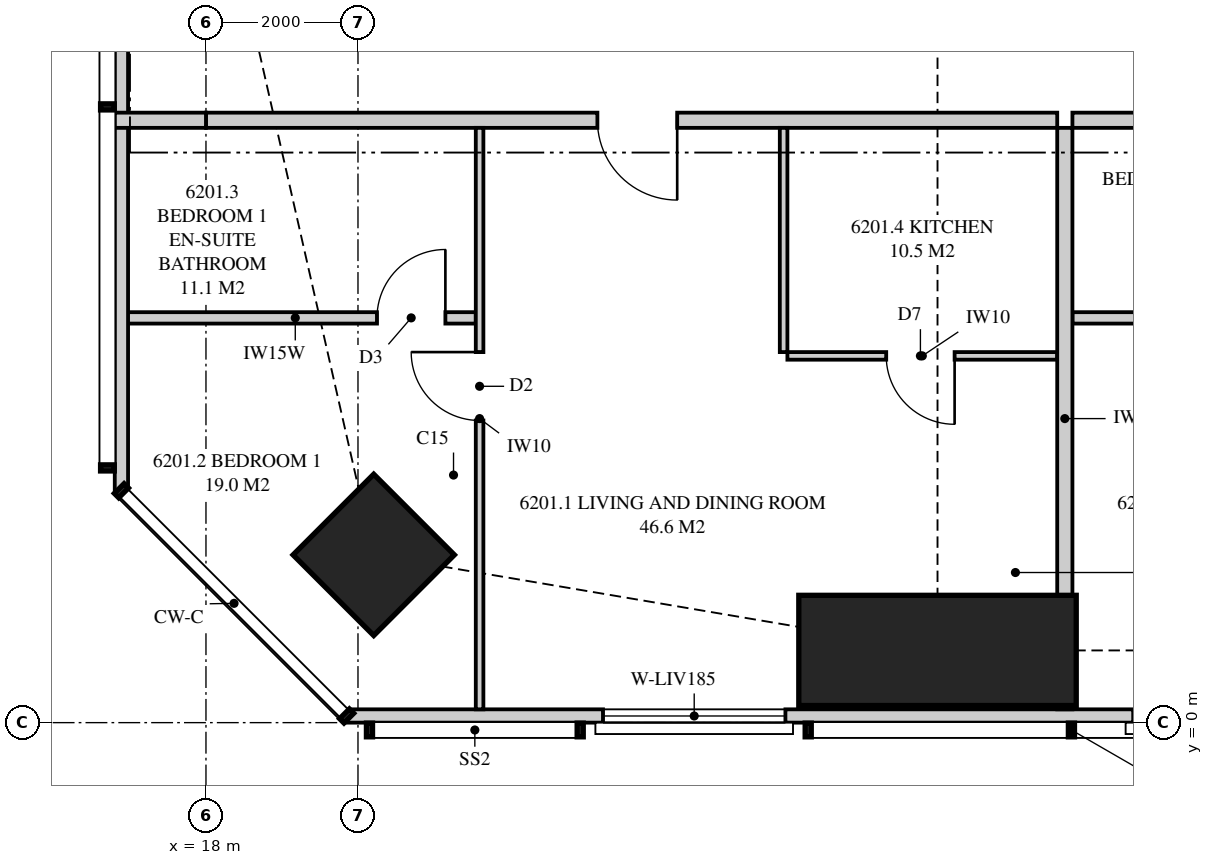
"""IFC4 building model, lengths in metres.
Left out: names, types, materials, properties, quantities, classifications, styles, units other than length and angle.
Written with IfcOpenShell. Run it as: python <this file> out.ifc"""

import sys

from ifc_helpers import new_model, si_unit, direction, frame, frame_2d, origin, origin_2d, place, context, subcontext, project, spatial, polyline, rectangle, outline, extrude, element, fill, save


model = new_model("IFC4")
c1 = context("Model", 3, precision=1e-05, world=origin(), true_north=direction((0.0, 1.0)))
c2 = subcontext(c1, "Body", "Model", "MODEL_VIEW")
j1 = project(units=[si_unit("LENGTHUNIT", "METRE"), si_unit("PLANEANGLEUNIT", "RADIAN")], contexts=[c1])
p1 = place(None, origin())
s1 = spatial("IfcSite", under=j1, at=p1, CompositionType="ELEMENT")
p2 = place(p1, origin())
s2 = spatial("IfcBuilding", under=s1, at=p2, CompositionType="ELEMENT")
p3 = place(p2, frame((0.0, 0.0, 228.45)))
s3 = spatial("IfcBuildingStorey", under=s2, at=p3, CompositionType="ELEMENT", Elevation=228.45)
p4 = place(p3, frame((20.207, 2.207, 0.0), z_axis=(0.0, 0.0, 1.0), x_axis=(0.707106781187, 0.707106781187, 0.0)))
e1 = element("IfcColumn", 1, at=p4, inside=s3, PredefinedType="COLUMN", context=c2, shape_type="SweptSolid", body=[
    extrude(rectangle(XDim=1.5, YDim=1.5, at=origin_2d()), origin(), (0.0, 0.0, 1.0), 3.5),
])
p5 = place(p3, frame((27.625, 0.95, 0.0), z_axis=(0.0, 0.0, 1.0), x_axis=(0.0, 1.0, 0.0)))
e2 = element("IfcColumn", 2, at=p5, inside=s3, PredefinedType="COLUMN", context=c2, shape_type="SweptSolid", body=[
    extrude(rectangle(XDim=1.45, YDim=3.65, at=origin_2d()), origin(), (0.0, 0.0, 1.0), 3.5),
])
p6 = place(p3, frame((19.851, 0.087, 0.0), z_axis=(0.0, 0.0, 1.0), x_axis=(1.0, 0.0, 0.0)))
e3 = element("IfcWall", 3, at=p6, inside=s3, PredefinedType="SOLIDWALL", context=c2, shape_type="SweptSolid", body=[
    extrude(outline(polyline([(0.0, 0.0), (33.597, 0.0), (33.597, 3.26), (27.239, 3.26), (27.239, 2.3), (27.155, 2.3), (27.155, 3.26), (27.024, 3.26), (27.024, 2.3), (7.774, 2.3), (7.774, 3.26), (7.642, 3.26), (7.642, 2.3), (7.559, 2.3), (7.559, 3.26), (0.0, 3.26), (0.0, 0.0)])), frame((0.0, 0.087, 0.0), z_axis=(0.0, -1.0, 0.0), x_axis=(1.0, 0.0, 0.0)), (0.0, 0.0, 1.0), 0.175),
])
p7 = place(p6, frame((3.373, 0.0, 0.4)))
e4 = element("IfcOpeningElement", 4, at=p7, cuts=e3, PredefinedType="OPENING", context=c2, shape_type="SweptSolid", body=[
    extrude(rectangle(XDim=2.4, YDim=1.85, at=frame_2d((1.2, 0.925))), frame((0.0, 0.097, 0.0), z_axis=(0.0, -1.0, 0.0), x_axis=(1.0, 0.0, 0.0)), (0.0, 0.0, 1.0), 0.195),
])
p8 = place(p6, frame((10.349, 0.0, 0.4)))
e5 = element("IfcOpeningElement", 5, at=p8, cuts=e3, PredefinedType="OPENING", context=c2, shape_type="SweptSolid", body=[
    extrude(rectangle(XDim=1.8, YDim=1.85, at=frame_2d((0.9, 0.925))), frame((0.0, 0.097, 0.0), z_axis=(0.0, -1.0, 0.0), x_axis=(1.0, 0.0, 0.0)), (0.0, 0.0, 1.0), 0.195),
])
p9 = place(p6, frame((13.289, 0.0, 0.0)))
e6 = element("IfcOpeningElement", 6, at=p9, cuts=e3, PredefinedType="OPENING", context=c2, shape_type="SweptSolid", body=[
    extrude(rectangle(XDim=1.8, YDim=2.25, at=frame_2d((0.9, 1.125))), frame((0.0, 0.097, 0.0), z_axis=(0.0, -1.0, 0.0), x_axis=(1.0, 0.0, 0.0)), (0.0, 0.0, 1.0), 0.195),
])
p10 = place(p6, frame((19.549, 0.0, 0.4)))
e7 = element("IfcOpeningElement", 7, at=p10, cuts=e3, PredefinedType="OPENING", context=c2, shape_type="SweptSolid", body=[
    extrude(rectangle(XDim=1.8, YDim=1.85, at=frame_2d((0.9, 0.925))), frame((0.0, 0.097, 0.0), z_axis=(0.0, -1.0, 0.0), x_axis=(1.0, 0.0, 0.0)), (0.0, 0.0, 1.0), 0.195),
])
p11 = place(p6, frame((23.149, 0.0, 0.4)))
e8 = element("IfcOpeningElement", 8, at=p11, cuts=e3, PredefinedType="OPENING", context=c2, shape_type="SweptSolid", body=[
    extrude(rectangle(XDim=1.8, YDim=1.85, at=frame_2d((0.9, 0.925))), frame((0.0, 0.097, 0.0), z_axis=(0.0, -1.0, 0.0), x_axis=(1.0, 0.0, 0.0)), (0.0, 0.0, 1.0), 0.195),
])
p12 = place(p6, frame((28.979, 0.0, 0.4)))
e9 = element("IfcOpeningElement", 9, at=p12, cuts=e3, PredefinedType="OPENING", context=c2, shape_type="SweptSolid", body=[
    extrude(rectangle(XDim=1.8, YDim=1.85, at=frame_2d((0.9, 0.925))), frame((0.0, 0.097, 0.0), z_axis=(0.0, -1.0, 0.0), x_axis=(1.0, 0.0, 0.0)), (0.0, 0.0, 1.0), 0.195),
])
p13 = place(p6, frame((31.861, 0.0, 0.4)))
e10 = element("IfcOpeningElement", 10, at=p13, cuts=e3, PredefinedType="OPENING", context=c2, shape_type="SweptSolid", body=[
    extrude(rectangle(XDim=1.2, YDim=1.85, at=frame_2d((0.6, 0.925))), frame((0.0, 0.097, 0.0), z_axis=(0.0, -1.0, 0.0), x_axis=(1.0, 0.0, 0.0)), (0.0, 0.0, 1.0), 0.195),
])
p14 = place(p3, frame((16.887, 30.949, 0.0), z_axis=(0.0, 0.0, 1.0), x_axis=(0.0, -1.0, 0.0)))
e11 = element("IfcWall", 11, at=p14, inside=s3, PredefinedType="SOLIDWALL", context=c2, shape_type="SweptSolid", body=[
    extrude(outline(polyline([(0.0, 0.0), (27.897, 0.0), (27.897, 3.26), (18.148, 3.26), (18.148, 2.3), (18.125, 2.3), (18.125, 3.26), (17.949, 3.26), (17.949, 2.3), (5.949, 2.3), (5.949, 3.26), (0.0, 3.26), (0.0, 0.0)])), frame((0.0, 0.087, 0.0), z_axis=(0.0, -1.0, 0.0), x_axis=(1.0, 0.0, 0.0)), (0.0, 0.0, 1.0), 0.175),
])
p15 = place(p14, frame((11.849, 0.0, 0.4)))
e12 = element("IfcOpeningElement", 12, at=p15, cuts=e11, PredefinedType="OPENING", context=c2, shape_type="SweptSolid", body=[
    extrude(rectangle(XDim=1.2, YDim=1.85, at=frame_2d((0.6, 0.925))), frame((0.0, 0.097, 0.0), z_axis=(0.0, -1.0, 0.0), x_axis=(1.0, 0.0, 0.0)), (0.0, 0.0, 1.0), 0.195),
])
p16 = place(p3, frame((29.3, 0.175, 0.0), z_axis=(0.0, 0.0, 1.0), x_axis=(0.0, 1.0, 0.0)))
e13 = element("IfcWall", 13, at=p16, inside=s3, PredefinedType="PARTITIONING", context=c2, shape_type="SweptSolid", body=[
    extrude(outline(polyline([(0.0, 0.0), (7.65, 0.0), (7.65, 3.26), (1.685, 3.26), (1.685, 2.3), (0.0, 2.3), (0.0, 3.26), (0.0, 0.0)])), frame((0.0, 0.1, 0.0), z_axis=(0.0, -1.0, 0.0), x_axis=(1.0, 0.0, 0.0)), (0.0, 0.0, 1.0), 0.2),
])
p17 = place(p3, frame((18.0, 7.925, 0.0), z_axis=(0.0, 0.0, 1.0), x_axis=(1.0, 0.0, 0.0)))
e14 = element("IfcWall", 14, at=p17, inside=s3, PredefinedType="PARTITIONING", context=c2, shape_type="SweptSolid", body=[
    extrude(outline(polyline([(0.0, 0.0), (11.2, 0.0), (11.2, 3.26), (10.935, 3.26), (10.935, 2.66), (8.315, 2.66), (8.315, 3.26), (1.839, 3.26), (1.839, 2.3), (0.0, 2.3), (0.0, 3.26), (0.0, 0.0)])), frame((0.0, 0.1, 0.0), z_axis=(0.0, -1.0, 0.0), x_axis=(1.0, 0.0, 0.0)), (0.0, 0.0, 1.0), 0.2),
])
p18 = place(p17, frame((5.15, 0.0, 0.0)))
e15 = element("IfcOpeningElement", 15, at=p18, cuts=e14, PredefinedType="OPENING", context=c2, shape_type="SweptSolid", body=[
    extrude(rectangle(XDim=1.05, YDim=2.2, at=frame_2d((0.525, 1.1))), frame((0.0, 0.11, 0.0), z_axis=(0.0, -1.0, 0.0), x_axis=(1.0, 0.0, 0.0)), (0.0, 0.0, 1.0), 0.22),
])
p19 = place(p3, frame((21.6, 0.175, 0.0), z_axis=(0.0, 0.0, 1.0), x_axis=(0.0, 1.0, 0.0)))
e16 = element("IfcWall", 16, at=p19, inside=s3, PredefinedType="PARTITIONING", context=c2, shape_type="SweptSolid", body=[
    extrude(outline(polyline([(0.0, 0.0), (7.65, 0.0), (7.65, 3.26), (2.668, 3.26), (2.668, 2.3), (0.924, 2.3), (0.924, 3.26), (0.0, 3.26), (0.0, 0.0)])), frame((0.0, 0.05, 0.0), z_axis=(0.0, -1.0, 0.0), x_axis=(1.0, 0.0, 0.0)), (0.0, 0.0, 1.0), 0.1),
])
p20 = place(p19, frame((3.8, 0.0, 0.0)))
e17 = element("IfcOpeningElement", 17, at=p20, cuts=e16, PredefinedType="OPENING", context=c2, shape_type="SweptSolid", body=[
    extrude(rectangle(XDim=0.9, YDim=2.1, at=frame_2d((0.45, 1.05))), frame((0.0, 0.06, 0.0), z_axis=(0.0, -1.0, 0.0), x_axis=(1.0, 0.0, 0.0)), (0.0, 0.0, 1.0), 0.12),
])
p21 = place(p3, frame((16.8, 5.325, 0.0), z_axis=(0.0, 0.0, 1.0), x_axis=(1.0, 0.0, 0.0)))
e18 = element("IfcWall", 18, at=p21, inside=s3, PredefinedType="PLUMBINGWALL", context=c2, shape_type="SweptSolid", body=[
    extrude(outline(polyline([(0.0, 0.0), (4.75, 0.0), (4.75, 3.26), (3.605, 3.26), (3.605, 2.3), (1.79, 2.3), (1.79, 3.26), (0.0, 3.26), (0.0, 0.0)])), frame((0.0, 0.075, 0.0), z_axis=(0.0, -1.0, 0.0), x_axis=(1.0, 0.0, 0.0)), (0.0, 0.0, 1.0), 0.15),
])
p22 = place(p21, frame((3.45, 0.0, 0.0)))
e19 = element("IfcOpeningElement", 19, at=p22, cuts=e18, PredefinedType="OPENING", context=c2, shape_type="SweptSolid", body=[
    extrude(rectangle(XDim=0.9, YDim=2.1, at=frame_2d((0.45, 1.05))), frame((0.0, 0.085, 0.0), z_axis=(0.0, -1.0, 0.0), x_axis=(1.0, 0.0, 0.0)), (0.0, 0.0, 1.0), 0.17),
])
p23 = place(p3, frame((25.65, 4.825, 0.0), z_axis=(0.0, 0.0, 1.0), x_axis=(1.0, 0.0, 0.0)))
e20 = element("IfcWall", 20, at=p23, inside=s3, PredefinedType="PARTITIONING", context=c2, shape_type="SweptSolid", body=[
    extrude(outline(polyline([(0.0, 0.0), (3.55, 0.0), (3.55, 3.26), (3.235, 3.26), (3.235, 2.66), (0.715, 2.66), (0.715, 3.26), (0.0, 3.26), (0.0, 0.0)])), frame((0.0, 0.05, 0.0), z_axis=(0.0, -1.0, 0.0), x_axis=(1.0, 0.0, 0.0)), (0.0, 0.0, 1.0), 0.1),
])
p24 = place(p23, frame((1.3, 0.0, 0.0)))
e21 = element("IfcOpeningElement", 21, at=p24, cuts=e20, PredefinedType="OPENING", context=c2, shape_type="SweptSolid", body=[
    extrude(rectangle(XDim=0.9, YDim=2.1, at=frame_2d((0.45, 1.05))), frame((0.0, 0.06, 0.0), z_axis=(0.0, -1.0, 0.0), x_axis=(1.0, 0.0, 0.0)), (0.0, 0.0, 1.0), 0.12),
])
p25 = place(p3, frame((25.6, 4.875, 0.0), z_axis=(0.0, 0.0, 1.0), x_axis=(0.0, 1.0, 0.0)))
e22 = element("IfcWall", 22, at=p25, inside=s3, PredefinedType="PARTITIONING", context=c2, shape_type="SweptSolid", body=[
    extrude(rectangle(XDim=2.95, YDim=0.1, at=frame_2d((1.475, 0.0))), origin(), (0.0, 0.0, 1.0), 3.26),
])
p26 = place(p3, frame((29.4, 7.925, 0.0), z_axis=(0.0, 0.0, 1.0), x_axis=(1.0, 0.0, 0.0)))
e23 = element("IfcWall", 23, at=p26, inside=s3, PredefinedType="PARTITIONING", context=c2, shape_type="SweptSolid", body=[
    extrude(outline(polyline([(0.0, 0.0), (9.0, 0.0), (9.0, 3.26), (9.0, 2.66), (6.54, 2.66), (6.54, 3.26), (0.0, 3.26), (0.0, 0.0)])), frame((0.0, 0.1, 0.0), z_axis=(0.0, -1.0, 0.0), x_axis=(1.0, 0.0, 0.0)), (0.0, 0.0, 1.0), 0.2),
])
p27 = place(p26, frame((4.0, 0.0, 0.0)))
e24 = element("IfcOpeningElement", 24, at=p27, cuts=e23, PredefinedType="OPENING", context=c2, shape_type="SweptSolid", body=[
    extrude(rectangle(XDim=1.05, YDim=2.2, at=frame_2d((0.525, 1.1))), frame((0.0, 0.11, 0.0), z_axis=(0.0, -1.0, 0.0), x_axis=(1.0, 0.0, 0.0)), (0.0, 0.0, 1.0), 0.22),
])
p28 = place(p3, frame((29.4, 5.325, 0.0), z_axis=(0.0, 0.0, 1.0), x_axis=(1.0, 0.0, 0.0)))
e25 = element("IfcWall", 25, at=p28, inside=s3, PredefinedType="PLUMBINGWALL", context=c2, shape_type="SweptSolid", body=[
    extrude(rectangle(XDim=3.45, YDim=0.15, at=frame_2d((1.725, 0.0))), origin(), (0.0, 0.0, 1.0), 3.26),
])
p29 = place(p28, frame((2.15, 0.0, 0.0)))
e26 = element("IfcOpeningElement", 26, at=p29, cuts=e25, PredefinedType="OPENING", context=c2, shape_type="SweptSolid", body=[
    extrude(rectangle(XDim=0.9, YDim=2.1, at=frame_2d((0.45, 1.05))), frame((0.0, 0.085, 0.0), z_axis=(0.0, -1.0, 0.0), x_axis=(1.0, 0.0, 0.0)), (0.0, 0.0, 1.0), 0.17),
])
p30 = place(p3, frame((16.8, 7.925, 0.0), z_axis=(0.0, 0.0, 1.0), x_axis=(1.0, 0.0, 0.0)))
e27 = element("IfcWall", 27, at=p30, inside=s3, PredefinedType="PARTITIONING", context=c2, shape_type="SweptSolid", body=[
    extrude(outline(polyline([(0.0, 0.0), (1.2, 0.0), (1.2, 3.26), (1.2, 2.3), (1.172, 2.3), (1.172, 3.26), (0.0, 3.26), (0.0, 0.0)])), frame((0.0, 0.1, 0.0), z_axis=(0.0, -1.0, 0.0), x_axis=(1.0, 0.0, 0.0)), (0.0, 0.0, 1.0), 0.2),
])
p31 = place(p7, origin())
e28 = element("IfcWindow", 28, at=p31, inside=s3, PartitioningType="SINGLE_PANEL", PredefinedType="WINDOW", context=c2, shape_type="SweptSolid", body=[
    extrude(rectangle(XDim=2.4, YDim=1.85, at=frame_2d((1.2, 0.925))), frame((0.0, 0.03, 0.0), z_axis=(0.0, -1.0, 0.0), x_axis=(1.0, 0.0, 0.0)), (0.0, 0.0, 1.0), 0.06),
])
fill(e4, e28)
p32 = place(p8, origin())
e29 = element("IfcWindow", 29, at=p32, inside=s3, PartitioningType="SINGLE_PANEL", PredefinedType="WINDOW", context=c2, shape_type="SweptSolid", body=[
    extrude(rectangle(XDim=1.8, YDim=1.85, at=frame_2d((0.9, 0.925))), frame((0.0, 0.03, 0.0), z_axis=(0.0, -1.0, 0.0), x_axis=(1.0, 0.0, 0.0)), (0.0, 0.0, 1.0), 0.06),
])
fill(e5, e29)
p33 = place(p18, frame((1.05, 0.0, 0.0), z_axis=(0.0, 0.0, 1.0), x_axis=(-1.0, 0.0, 0.0)))
e30 = element("IfcDoor", 30, at=p33, inside=s3, OperationType="SINGLE_SWING_LEFT", PredefinedType="DOOR", context=c2, shape_type="SweptSolid", body=[
    extrude(rectangle(XDim=1.05, YDim=2.2, at=frame_2d((0.525, 1.1))), frame((0.0, 0.025, 0.0), z_axis=(0.0, -1.0, 0.0), x_axis=(1.0, 0.0, 0.0)), (0.0, 0.0, 1.0), 0.05),
])
fill(e15, e30)
p34 = place(p20, origin())
e31 = element("IfcDoor", 31, at=p34, inside=s3, OperationType="SINGLE_SWING_RIGHT", PredefinedType="DOOR", context=c2, shape_type="SweptSolid", body=[
    extrude(rectangle(XDim=0.9, YDim=2.1, at=frame_2d((0.45, 1.05))), frame((0.0, 0.025, 0.0), z_axis=(0.0, -1.0, 0.0), x_axis=(1.0, 0.0, 0.0)), (0.0, 0.0, 1.0), 0.05),
])
fill(e17, e31)
p35 = place(p22, origin())
e32 = element("IfcDoor", 32, at=p35, inside=s3, OperationType="SINGLE_SWING_RIGHT", PredefinedType="DOOR", context=c2, shape_type="SweptSolid", body=[
    extrude(rectangle(XDim=0.9, YDim=2.1, at=frame_2d((0.45, 1.05))), frame((0.0, 0.025, 0.0), z_axis=(0.0, -1.0, 0.0), x_axis=(1.0, 0.0, 0.0)), (0.0, 0.0, 1.0), 0.05),
])
fill(e19, e32)
p36 = place(p24, frame((0.9, 0.0, 0.0), z_axis=(0.0, 0.0, 1.0), x_axis=(-1.0, 0.0, 0.0)))
e33 = element("IfcDoor", 33, at=p36, inside=s3, OperationType="SINGLE_SWING_LEFT", PredefinedType="DOOR", context=c2, shape_type="SweptSolid", body=[
    extrude(rectangle(XDim=0.9, YDim=2.1, at=frame_2d((0.45, 1.05))), frame((0.0, 0.025, 0.0), z_axis=(0.0, -1.0, 0.0), x_axis=(1.0, 0.0, 0.0)), (0.0, 0.0, 1.0), 0.05),
])
fill(e21, e33)
save(model, sys.argv[1])
